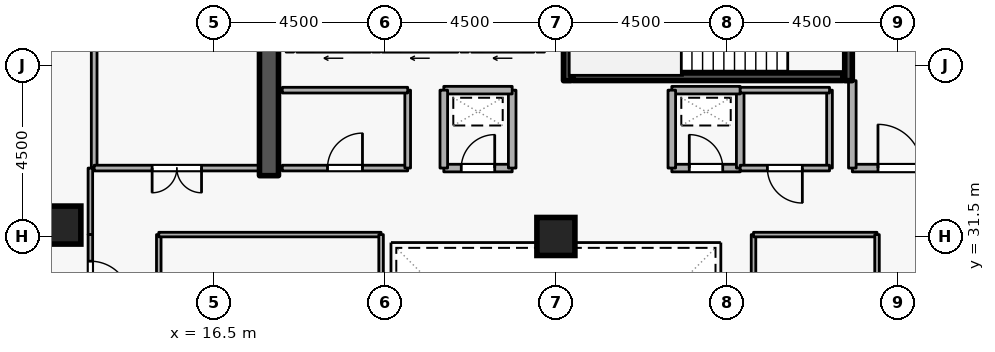
"""IFC4 building model, lengths in metres.
Left out: names, types, materials, properties, quantities, classifications, styles, units other than length and angle.
Written with IfcOpenShell. Run it as: python <this file> out.ifc"""

import sys

from ifc_helpers import new_model, si_unit, direction, frame, frame_2d, origin, origin_2d, place, context, subcontext, project, spatial, rectangle, extrude, element, fill, save


model = new_model("IFC4")
c1 = context("Model", 3, precision=1e-05, world=origin(), true_north=direction((0.0, 1.0)))
c2 = subcontext(c1, "Body", "Model", "MODEL_VIEW")
j1 = project(units=[si_unit("LENGTHUNIT", "METRE"), si_unit("PLANEANGLEUNIT", "RADIAN")], contexts=[c1])
p1 = place(None, origin())
s1 = spatial("IfcSite", under=j1, at=p1, CompositionType="ELEMENT")
p2 = place(p1, origin())
s2 = spatial("IfcBuilding", under=s1, at=p2, CompositionType="ELEMENT")
p3 = place(p2, frame((0.0, 0.0, 233.1)))
s3 = spatial("IfcBuildingStorey", under=s2, at=p3, CompositionType="ELEMENT", Elevation=233.1)
p4 = place(p3, frame((17.95, 33.1, 0.0), z_axis=(0.0, 0.0, 1.0), x_axis=(0.0, 1.0, 0.0)))
e1 = element("IfcWall", 1, at=p4, inside=s3, PredefinedType="SHEAR", context=c2, shape_type="SweptSolid", body=[
    extrude(rectangle(XDim=5.8, YDim=0.5, at=frame_2d((2.9, 0.0))), origin(), (0.0, 0.0, 1.0), 3.6),
])
for number, where, z_axis, x_axis in (
    (2, (12.5, 31.8, 0.0), (0.0, 0.0, 1.0), (1.0, 0.0, 0.0)),
    (3, (25.5, 31.5, 0.0), (0.0, 0.0, 1.0), (1.0, 0.0, 0.0)),
):
    element("IfcColumn", number, at=place(p3, frame(where, z_axis=z_axis, x_axis=x_axis)), inside=s3, PredefinedType="COLUMN", context=c2, shape_type="SweptSolid", body=[
        extrude(rectangle(XDim=1.0, YDim=1.0, at=origin_2d()), origin(), (0.0, 0.0, 1.0), 3.6),
    ])
p5 = place(p3, frame((24.92, 36.45, 0.0), z_axis=(0.0, 0.0, 1.0), x_axis=(-1.0, 0.0, 0.0)))
e4 = element("IfcWall", 4, at=p5, inside=s3, PredefinedType="STANDARD", context=c2, shape_type="SweptSolid", body=[
    extrude(rectangle(XDim=1.64, YDim=0.2, at=frame_2d((0.82, 0.0))), origin(), (0.0, 0.0, 1.0), 3.34),
])
p6 = place(p5, frame((0.31, 0.0, 0.0)))
e5 = element("IfcOpeningElement", 5, at=p6, cuts=e4, PredefinedType="OPENING", context=c2, shape_type="SweptSolid", body=[
    extrude(rectangle(XDim=1.02, YDim=2.06, at=frame_2d((0.51, 1.03))), frame((0.0, 0.11, 0.0), z_axis=(0.0, -1.0, 0.0), x_axis=(1.0, 0.0, 0.0)), (0.0, 0.0, 1.0), 0.22),
])
p7 = place(p3, frame((22.92, 36.45, 0.0), z_axis=(0.0, 0.0, 1.0), x_axis=(-1.0, 0.0, 0.0)))
e6 = element("IfcWall", 6, at=p7, inside=s3, PredefinedType="STANDARD", context=c2, shape_type="SweptSolid", body=[
    extrude(rectangle(XDim=1.99, YDim=0.2, at=frame_2d((0.995, 0.0))), origin(), (0.0, 0.0, 1.0), 3.34),
])
p8 = place(p7, frame((0.485, 0.0, 0.0)))
e7 = element("IfcOpeningElement", 7, at=p8, cuts=e6, PredefinedType="OPENING", context=c2, shape_type="SweptSolid", body=[
    extrude(rectangle(XDim=1.02, YDim=2.06, at=frame_2d((0.51, 1.03))), frame((0.0, 0.11, 0.0), z_axis=(0.0, -1.0, 0.0), x_axis=(1.0, 0.0, 0.0)), (0.0, 0.0, 1.0), 0.22),
])
p9 = place(p3, frame((20.62, 36.45, 0.0), z_axis=(0.0, 0.0, 1.0), x_axis=(-1.0, 0.0, 0.0)))
e8 = element("IfcWall", 8, at=p9, inside=s3, PredefinedType="STANDARD", context=c2, shape_type="SweptSolid", body=[
    extrude(rectangle(XDim=1.94, YDim=0.2, at=frame_2d((0.97, 0.0))), origin(), (0.0, 0.0, 1.0), 3.34),
])
p10 = place(p9, frame((0.46, 0.0, 0.0)))
e9 = element("IfcOpeningElement", 9, at=p10, cuts=e8, PredefinedType="OPENING", context=c2, shape_type="SweptSolid", body=[
    extrude(rectangle(XDim=1.02, YDim=2.06, at=frame_2d((0.51, 1.03))), frame((0.0, 0.11, 0.0), z_axis=(0.0, -1.0, 0.0), x_axis=(1.0, 0.0, 0.0)), (0.0, 0.0, 1.0), 0.22),
])
p11 = place(p3, frame((33.2, 38.95, 0.0), z_axis=(0.0, 0.0, 1.0), x_axis=(0.0, -1.0, 0.0)))
e10 = element("IfcWall", 10, at=p11, inside=s3, PredefinedType="SHEAR", context=c2, shape_type="SweptSolid", body=[
    extrude(rectangle(XDim=3.35, YDim=0.2, at=frame_2d((1.675, 0.0))), origin(), (0.0, 0.0, 1.0), 3.6),
])
p12 = place(p11, frame((1.125, 0.0, 0.0)))
e11 = element("IfcOpeningElement", 11, at=p12, cuts=e10, PredefinedType="OPENING", context=c2, shape_type="SweptSolid", body=[
    extrude(rectangle(XDim=1.1, YDim=2.1, at=frame_2d((0.55, 1.05))), frame((0.0, 0.11, 0.0), z_axis=(0.0, -1.0, 0.0), x_axis=(1.0, 0.0, 0.0)), (0.0, 0.0, 1.0), 0.22),
])
p13 = place(p3, frame((25.8, 35.6, 0.0), z_axis=(0.0, 0.0, 1.0), x_axis=(0.0, 1.0, 0.0)))
e12 = element("IfcWall", 12, at=p13, inside=s3, PredefinedType="SHEAR", context=c2, shape_type="SweptSolid", body=[
    extrude(rectangle(XDim=3.35, YDim=0.2, at=frame_2d((1.675, 0.0))), origin(), (0.0, 0.0, 1.0), 3.6),
])
p14 = place(p3, frame((25.95, 35.703, 0.0), z_axis=(0.0, 0.0, 1.0), x_axis=(1.0, 0.0, 0.0)))
e13 = element("IfcWall", 13, at=p14, inside=s3, PredefinedType="SHEAR", context=c2, shape_type="SweptSolid", body=[
    extrude(rectangle(XDim=7.1, YDim=0.2, at=frame_2d((3.55, 0.0))), origin(), (0.0, 0.0, 1.0), 3.6),
])
p15 = place(p3, frame((33.3, 33.3, 0.0), z_axis=(0.0, 0.0, 1.0), x_axis=(1.0, 0.0, 0.0)))
e14 = element("IfcWall", 14, at=p15, inside=s3, PredefinedType="STANDARD", context=c2, shape_type="SweptSolid", body=[
    extrude(rectangle(XDim=2.5, YDim=0.2, at=frame_2d((1.25, 0.0))), origin(), (0.0, 0.0, 1.0), 3.34),
])
p16 = place(p15, frame((0.675, 0.0, 0.0)))
e15 = element("IfcOpeningElement", 15, at=p16, cuts=e14, PredefinedType="OPENING", context=c2, shape_type="SweptSolid", body=[
    extrude(rectangle(XDim=1.15, YDim=2.1, at=frame_2d((0.575, 1.05))), frame((0.0, 0.11, 0.0), z_axis=(0.0, -1.0, 0.0), x_axis=(1.0, 0.0, 0.0)), (0.0, 0.0, 1.0), 0.22),
])
p17 = place(p3, frame((33.3, 35.6, 0.0), z_axis=(0.0, 0.0, 1.0), x_axis=(0.0, -1.0, 0.0)))
e16 = element("IfcWall", 16, at=p17, inside=s3, PredefinedType="STANDARD", context=c2, shape_type="SweptSolid", body=[
    extrude(rectangle(XDim=2.3, YDim=0.2, at=frame_2d((1.15, 0.0))), origin(), (0.0, 0.0, 1.0), 2.545),
])
p18 = place(p3, frame((22.55, 33.3, 0.0), z_axis=(0.0, 0.0, 1.0), x_axis=(1.0, 0.0, 0.0)))
e17 = element("IfcWall", 17, at=p18, inside=s3, PredefinedType="STANDARD", context=c2, shape_type="SweptSolid", body=[
    extrude(rectangle(XDim=1.8, YDim=0.2, at=frame_2d((0.9, 0.0))), origin(), (0.0, 0.0, 1.0), 3.34),
])
p19 = place(p18, frame((0.46, 0.0, 0.0)))
e18 = element("IfcOpeningElement", 18, at=p19, cuts=e17, PredefinedType="OPENING", context=c2, shape_type="SweptSolid", body=[
    extrude(rectangle(XDim=0.88, YDim=2.04, at=frame_2d((0.44, 1.02))), frame((0.0, 0.11, 0.0), z_axis=(0.0, -1.0, 0.0), x_axis=(1.0, 0.0, 0.0)), (0.0, 0.0, 1.0), 0.22),
])
p20 = place(p3, frame((24.35, 33.3, 0.0), z_axis=(0.0, 0.0, 1.0), x_axis=(0.0, 1.0, 0.0)))
e19 = element("IfcWall", 19, at=p20, inside=s3, PredefinedType="STANDARD", context=c2, shape_type="SweptSolid", body=[
    extrude(rectangle(XDim=2.05, YDim=0.2, at=frame_2d((1.025, 0.0))), origin(), (0.0, 0.0, 1.0), 3.34),
])
p21 = place(p3, frame((24.35, 35.35, 0.0), z_axis=(0.0, 0.0, 1.0), x_axis=(-1.0, 0.0, 0.0)))
e20 = element("IfcWall", 20, at=p21, inside=s3, PredefinedType="STANDARD", context=c2, shape_type="SweptSolid", body=[
    extrude(rectangle(XDim=1.8, YDim=0.2, at=frame_2d((0.9, 0.0))), origin(), (0.0, 0.0, 1.0), 3.34),
])
p22 = place(p3, frame((22.55, 35.35, 0.0), z_axis=(0.0, 0.0, 1.0), x_axis=(0.0, -1.0, 0.0)))
e21 = element("IfcWall", 21, at=p22, inside=s3, PredefinedType="STANDARD", context=c2, shape_type="SweptSolid", body=[
    extrude(rectangle(XDim=2.05, YDim=0.2, at=frame_2d((1.025, 0.0))), origin(), (0.0, 0.0, 1.0), 3.34),
])
p23 = place(p3, frame((28.55, 33.3, 0.0), z_axis=(0.0, 0.0, 1.0), x_axis=(1.0, 0.0, 0.0)))
e22 = element("IfcWall", 22, at=p23, inside=s3, PredefinedType="STANDARD", context=c2, shape_type="SweptSolid", body=[
    extrude(rectangle(XDim=1.8, YDim=0.2, at=frame_2d((0.9, 0.0))), origin(), (0.0, 0.0, 1.0), 3.34),
])
p24 = place(p23, frame((0.46, 0.0, 0.0)))
e23 = element("IfcOpeningElement", 23, at=p24, cuts=e22, PredefinedType="OPENING", context=c2, shape_type="SweptSolid", body=[
    extrude(rectangle(XDim=0.88, YDim=2.04, at=frame_2d((0.44, 1.02))), frame((0.0, 0.11, 0.0), z_axis=(0.0, -1.0, 0.0), x_axis=(1.0, 0.0, 0.0)), (0.0, 0.0, 1.0), 0.22),
])
p25 = place(p3, frame((30.35, 33.3, 0.0), z_axis=(0.0, 0.0, 1.0), x_axis=(0.0, 1.0, 0.0)))
e24 = element("IfcWall", 24, at=p25, inside=s3, PredefinedType="STANDARD", context=c2, shape_type="SweptSolid", body=[
    extrude(rectangle(XDim=2.05, YDim=0.2, at=frame_2d((1.025, 0.0))), origin(), (0.0, 0.0, 1.0), 3.34),
])
p26 = place(p3, frame((30.35, 35.35, 0.0), z_axis=(0.0, 0.0, 1.0), x_axis=(-1.0, 0.0, 0.0)))
e25 = element("IfcWall", 25, at=p26, inside=s3, PredefinedType="STANDARD", context=c2, shape_type="SweptSolid", body=[
    extrude(rectangle(XDim=1.8, YDim=0.2, at=frame_2d((0.9, 0.0))), origin(), (0.0, 0.0, 1.0), 3.34),
])
p27 = place(p3, frame((28.55, 35.35, 0.0), z_axis=(0.0, 0.0, 1.0), x_axis=(0.0, -1.0, 0.0)))
e26 = element("IfcWall", 26, at=p27, inside=s3, PredefinedType="STANDARD", context=c2, shape_type="SweptSolid", body=[
    extrude(rectangle(XDim=2.05, YDim=0.2, at=frame_2d((1.025, 0.0))), origin(), (0.0, 0.0, 1.0), 3.34),
])
p28 = place(p3, frame((18.3, 33.3, 0.0), z_axis=(0.0, 0.0, 1.0), x_axis=(1.0, 0.0, 0.0)))
e27 = element("IfcWall", 27, at=p28, inside=s3, PredefinedType="PARTITIONING", context=c2, shape_type="SweptSolid", body=[
    extrude(rectangle(XDim=3.3, YDim=0.15, at=frame_2d((1.65, 0.0))), origin(), (0.0, 0.0, 1.0), 3.34),
])
p29 = place(p28, frame((1.19, 0.0, 0.0)))
e28 = element("IfcOpeningElement", 28, at=p29, cuts=e27, PredefinedType="OPENING", context=c2, shape_type="SweptSolid", body=[
    extrude(rectangle(XDim=0.92, YDim=2.08, at=frame_2d((0.46, 1.04))), frame((0.0, 0.085, 0.0), z_axis=(0.0, -1.0, 0.0), x_axis=(1.0, 0.0, 0.0)), (0.0, 0.0, 1.0), 0.17),
])
p30 = place(p3, frame((21.6, 33.3, 0.0), z_axis=(0.0, 0.0, 1.0), x_axis=(0.0, 1.0, 0.0)))
e29 = element("IfcWall", 29, at=p30, inside=s3, PredefinedType="PARTITIONING", context=c2, shape_type="SweptSolid", body=[
    extrude(rectangle(XDim=2.05, YDim=0.15, at=frame_2d((1.025, 0.0))), origin(), (0.0, 0.0, 1.0), 3.34),
])
p31 = place(p3, frame((21.6, 35.35, 0.0), z_axis=(0.0, 0.0, 1.0), x_axis=(-1.0, 0.0, 0.0)))
e30 = element("IfcWall", 30, at=p31, inside=s3, PredefinedType="PARTITIONING", context=c2, shape_type="SweptSolid", body=[
    extrude(rectangle(XDim=3.3, YDim=0.15, at=frame_2d((1.65, 0.0))), origin(), (0.0, 0.0, 1.0), 3.34),
])
p32 = place(p3, frame((32.7, 35.35, 0.0), z_axis=(0.0, 0.0, 1.0), x_axis=(0.0, -1.0, 0.0)))
e31 = element("IfcWall", 31, at=p32, inside=s3, PredefinedType="PARTITIONING", context=c2, shape_type="SweptSolid", body=[
    extrude(rectangle(XDim=2.05, YDim=0.15, at=frame_2d((1.025, 0.0))), origin(), (0.0, 0.0, 1.0), 2.545),
])
p33 = place(p3, frame((32.7, 33.3, 0.0), z_axis=(0.0, 0.0, 1.0), x_axis=(-1.0, 0.0, 0.0)))
e32 = element("IfcWall", 32, at=p33, inside=s3, PredefinedType="PARTITIONING", context=c2, shape_type="SweptSolid", body=[
    extrude(rectangle(XDim=2.35, YDim=0.15, at=frame_2d((1.175, 0.0))), origin(), (0.0, 0.0, 1.0), 3.34),
])
p34 = place(p33, frame((0.715, 0.0, 0.0)))
e33 = element("IfcOpeningElement", 33, at=p34, cuts=e32, PredefinedType="OPENING", context=c2, shape_type="SweptSolid", body=[
    extrude(rectangle(XDim=0.92, YDim=2.08, at=frame_2d((0.46, 1.04))), frame((0.0, 0.085, 0.0), z_axis=(0.0, -1.0, 0.0), x_axis=(1.0, 0.0, 0.0)), (0.0, 0.0, 1.0), 0.17),
])
p35 = place(p3, frame((30.35, 35.35, 0.0), z_axis=(0.0, 0.0, 1.0), x_axis=(1.0, 0.0, 0.0)))
e34 = element("IfcWall", 34, at=p35, inside=s3, PredefinedType="PARTITIONING", context=c2, shape_type="SweptSolid", body=[
    extrude(rectangle(XDim=2.35, YDim=0.15, at=frame_2d((1.175, 0.0))), origin(), (0.0, 0.0, 1.0), 3.34),
])
p36 = place(p3, frame((13.35, 33.3, 0.0), z_axis=(0.0, 0.0, 1.0), x_axis=(0.0, 1.0, 0.0)))
e35 = element("IfcWall", 35, at=p36, inside=s3, PredefinedType="PARTITIONING", context=c2, shape_type="SweptSolid", body=[
    extrude(rectangle(XDim=11.42, YDim=0.15, at=frame_2d((5.71, 0.0))), origin(), (0.0, 0.0, 1.0), 3.34),
])
p37 = place(p3, frame((17.7, 33.3, 0.0), z_axis=(0.0, 0.0, 1.0), x_axis=(-1.0, 0.0, 0.0)))
e36 = element("IfcWall", 36, at=p37, inside=s3, PredefinedType="PARTITIONING", context=c2, shape_type="SweptSolid", body=[
    extrude(rectangle(XDim=4.35, YDim=0.15, at=frame_2d((2.175, 0.0))), origin(), (0.0, 0.0, 1.0), 3.34),
])
p38 = place(p37, frame((1.525, 0.0, 0.0)))
e37 = element("IfcOpeningElement", 37, at=p38, cuts=e36, PredefinedType="OPENING", context=c2, shape_type="SweptSolid", body=[
    extrude(rectangle(XDim=1.3, YDim=2.12, at=frame_2d((0.65, 1.06))), frame((0.0, 0.085, 0.0), z_axis=(0.0, -1.0, 0.0), x_axis=(1.0, 0.0, 0.0)), (0.0, 0.0, 1.0), 0.17),
])
p39 = place(p3, frame((13.25, 33.3, 0.0), z_axis=(0.0, 0.0, 1.0), x_axis=(0.0, -1.0, 0.0)))
e38 = element("IfcWall", 38, at=p39, inside=s3, PredefinedType="PARTITIONING", context=c2, shape_type="SweptSolid", body=[
    extrude(rectangle(XDim=1.75, YDim=0.12, at=frame_2d((0.875, 0.0))), origin(), (0.0, 0.0, 1.0), 3.34),
])
p40 = place(p3, frame((13.25, 31.55, 0.0), z_axis=(0.0, 0.0, 1.0), x_axis=(0.0, -1.0, 0.0)))
e39 = element("IfcWall", 39, at=p40, inside=s3, PredefinedType="PARTITIONING", context=c2, shape_type="SweptSolid", body=[
    extrude(rectangle(XDim=2.45, YDim=0.12, at=frame_2d((1.225, 0.0))), origin(), (0.0, 0.0, 1.0), 3.34),
])
p41 = place(p40, frame((0.7, 0.0, 0.0)))
e40 = element("IfcOpeningElement", 40, at=p41, cuts=e39, PredefinedType="OPENING", context=c2, shape_type="SweptSolid", body=[
    extrude(rectangle(XDim=1.05, YDim=2.1, at=frame_2d((0.525, 1.05))), frame((0.0, 0.07, 0.0), z_axis=(0.0, -1.0, 0.0), x_axis=(1.0, 0.0, 0.0)), (0.0, 0.0, 1.0), 0.14),
])
p42 = place(p3, frame((15.05, 22.45, 0.0), z_axis=(0.0, 0.0, 1.0), x_axis=(0.0, 1.0, 0.0)))
e41 = element("IfcWall", 41, at=p42, inside=s3, PredefinedType="PARTITIONING", context=c2, shape_type="SweptSolid", body=[
    extrude(rectangle(XDim=9.1, YDim=0.12, at=frame_2d((4.55, 0.0))), origin(), (0.0, 0.0, 1.0), 3.34),
])
p43 = place(p42, frame((4.075, 0.0, 0.0)))
e42 = element("IfcOpeningElement", 42, at=p43, cuts=e41, PredefinedType="OPENING", context=c2, shape_type="SweptSolid", body=[
    extrude(rectangle(XDim=0.95, YDim=2.1, at=frame_2d((0.475, 1.05))), frame((0.0, 0.07, 0.0), z_axis=(0.0, -1.0, 0.0), x_axis=(1.0, 0.0, 0.0)), (0.0, 0.0, 1.0), 0.14),
])
p44 = place(p3, frame((15.05, 31.55, 0.0), z_axis=(0.0, 0.0, 1.0), x_axis=(1.0, 0.0, 0.0)))
e43 = element("IfcWall", 43, at=p44, inside=s3, PredefinedType="PARTITIONING", context=c2, shape_type="SweptSolid", body=[
    extrude(rectangle(XDim=5.85, YDim=0.12, at=frame_2d((2.925, 0.0))), origin(), (0.0, 0.0, 1.0), 3.34),
])
for number, where, z_axis, x_axis in (
    (44, (20.9, 31.55, 0.0), (0.0, 0.0, 1.0), (0.0, -1.0, 0.0)),
    (45, (30.7, 22.45, 0.0), (0.0, 0.0, 1.0), (0.0, 1.0, 0.0)),
):
    element("IfcWall", number, at=place(p3, frame(where, z_axis=z_axis, x_axis=x_axis)), inside=s3, PredefinedType="PARTITIONING", context=c2, shape_type="SweptSolid", body=[
        extrude(rectangle(XDim=9.1, YDim=0.12, at=frame_2d((4.55, 0.0))), origin(), (0.0, 0.0, 1.0), 3.34),
    ])
p45 = place(p3, frame((30.7, 31.55, 0.0), z_axis=(0.0, 0.0, 1.0), x_axis=(1.0, 0.0, 0.0)))
e46 = element("IfcWall", 46, at=p45, inside=s3, PredefinedType="PARTITIONING", context=c2, shape_type="SweptSolid", body=[
    extrude(rectangle(XDim=3.25, YDim=0.12, at=frame_2d((1.625, 0.0))), origin(), (0.0, 0.0, 1.0), 3.34),
])
p46 = place(p3, frame((33.95, 31.55, 0.0), z_axis=(0.0, 0.0, 1.0), x_axis=(0.0, -1.0, 0.0)))
e47 = element("IfcWall", 47, at=p46, inside=s3, PredefinedType="PARTITIONING", context=c2, shape_type="SweptSolid", body=[
    extrude(rectangle(XDim=9.1, YDim=0.12, at=frame_2d((4.55, 0.0))), origin(), (0.0, 0.0, 1.0), 3.34),
])
p47 = place(p46, frame((4.075, 0.0, 0.0)))
e48 = element("IfcOpeningElement", 48, at=p47, cuts=e47, PredefinedType="OPENING", context=c2, shape_type="SweptSolid", body=[
    extrude(rectangle(XDim=0.95, YDim=2.1, at=frame_2d((0.475, 1.05))), frame((0.0, 0.07, 0.0), z_axis=(0.0, -1.0, 0.0), x_axis=(1.0, 0.0, 0.0)), (0.0, 0.0, 1.0), 0.14),
])
p48 = place(p16, origin())
e49 = element("IfcDoor", 49, at=p48, inside=s3, OperationType="SINGLE_SWING_LEFT", PredefinedType="DOOR", context=c2, shape_type="SweptSolid", body=[
    extrude(rectangle(XDim=1.15, YDim=2.1, at=frame_2d((0.575, 1.05))), frame((0.0, 0.025, 0.0), z_axis=(0.0, -1.0, 0.0), x_axis=(1.0, 0.0, 0.0)), (0.0, 0.0, 1.0), 0.05),
])
fill(e15, e49)
p49 = place(p19, origin())
e50 = element("IfcDoor", 50, at=p49, inside=s3, OperationType="SINGLE_SWING_RIGHT", PredefinedType="DOOR", context=c2, shape_type="SweptSolid", body=[
    extrude(rectangle(XDim=0.88, YDim=2.04, at=frame_2d((0.44, 1.02))), frame((0.0, 0.025, 0.0), z_axis=(0.0, -1.0, 0.0), x_axis=(1.0, 0.0, 0.0)), (0.0, 0.0, 1.0), 0.05),
])
fill(e18, e50)
p50 = place(p24, origin())
e51 = element("IfcDoor", 51, at=p50, inside=s3, OperationType="SINGLE_SWING_LEFT", PredefinedType="DOOR", context=c2, shape_type="SweptSolid", body=[
    extrude(rectangle(XDim=0.88, YDim=2.04, at=frame_2d((0.44, 1.02))), frame((0.0, 0.025, 0.0), z_axis=(0.0, -1.0, 0.0), x_axis=(1.0, 0.0, 0.0)), (0.0, 0.0, 1.0), 0.05),
])
fill(e23, e51)
p51 = place(p29, origin())
e52 = element("IfcDoor", 52, at=p51, inside=s3, OperationType="SINGLE_SWING_RIGHT", PredefinedType="DOOR", context=c2, shape_type="SweptSolid", body=[
    extrude(rectangle(XDim=0.92, YDim=2.08, at=frame_2d((0.46, 1.04))), frame((0.0, 0.025, 0.0), z_axis=(0.0, -1.0, 0.0), x_axis=(1.0, 0.0, 0.0)), (0.0, 0.0, 1.0), 0.05),
])
fill(e28, e52)
p52 = place(p34, origin())
e53 = element("IfcDoor", 53, at=p52, inside=s3, OperationType="SINGLE_SWING_LEFT", PredefinedType="DOOR", context=c2, shape_type="SweptSolid", body=[
    extrude(rectangle(XDim=0.92, YDim=2.08, at=frame_2d((0.46, 1.04))), frame((0.0, 0.025, 0.0), z_axis=(0.0, -1.0, 0.0), x_axis=(1.0, 0.0, 0.0)), (0.0, 0.0, 1.0), 0.05),
])
fill(e33, e53)
p53 = place(p38, origin())
e54 = element("IfcDoor", 54, at=p53, inside=s3, OperationType="DOUBLE_DOOR_SINGLE_SWING", PredefinedType="DOOR", context=c2, shape_type="SweptSolid", body=[
    extrude(rectangle(XDim=1.3, YDim=2.12, at=frame_2d((0.65, 1.06))), frame((0.0, 0.025, 0.0), z_axis=(0.0, -1.0, 0.0), x_axis=(1.0, 0.0, 0.0)), (0.0, 0.0, 1.0), 0.05),
])
fill(e37, e54)
p54 = place(p41, origin())
e55 = element("IfcDoor", 55, at=p54, inside=s3, OperationType="SINGLE_SWING_RIGHT", PredefinedType="DOOR", context=c2, shape_type="SweptSolid", body=[
    extrude(rectangle(XDim=1.05, YDim=2.1, at=frame_2d((0.525, 1.05))), frame((0.0, 0.025, 0.0), z_axis=(0.0, -1.0, 0.0), x_axis=(1.0, 0.0, 0.0)), (0.0, 0.0, 1.0), 0.05),
])
fill(e40, e55)
save(model, sys.argv[1])
